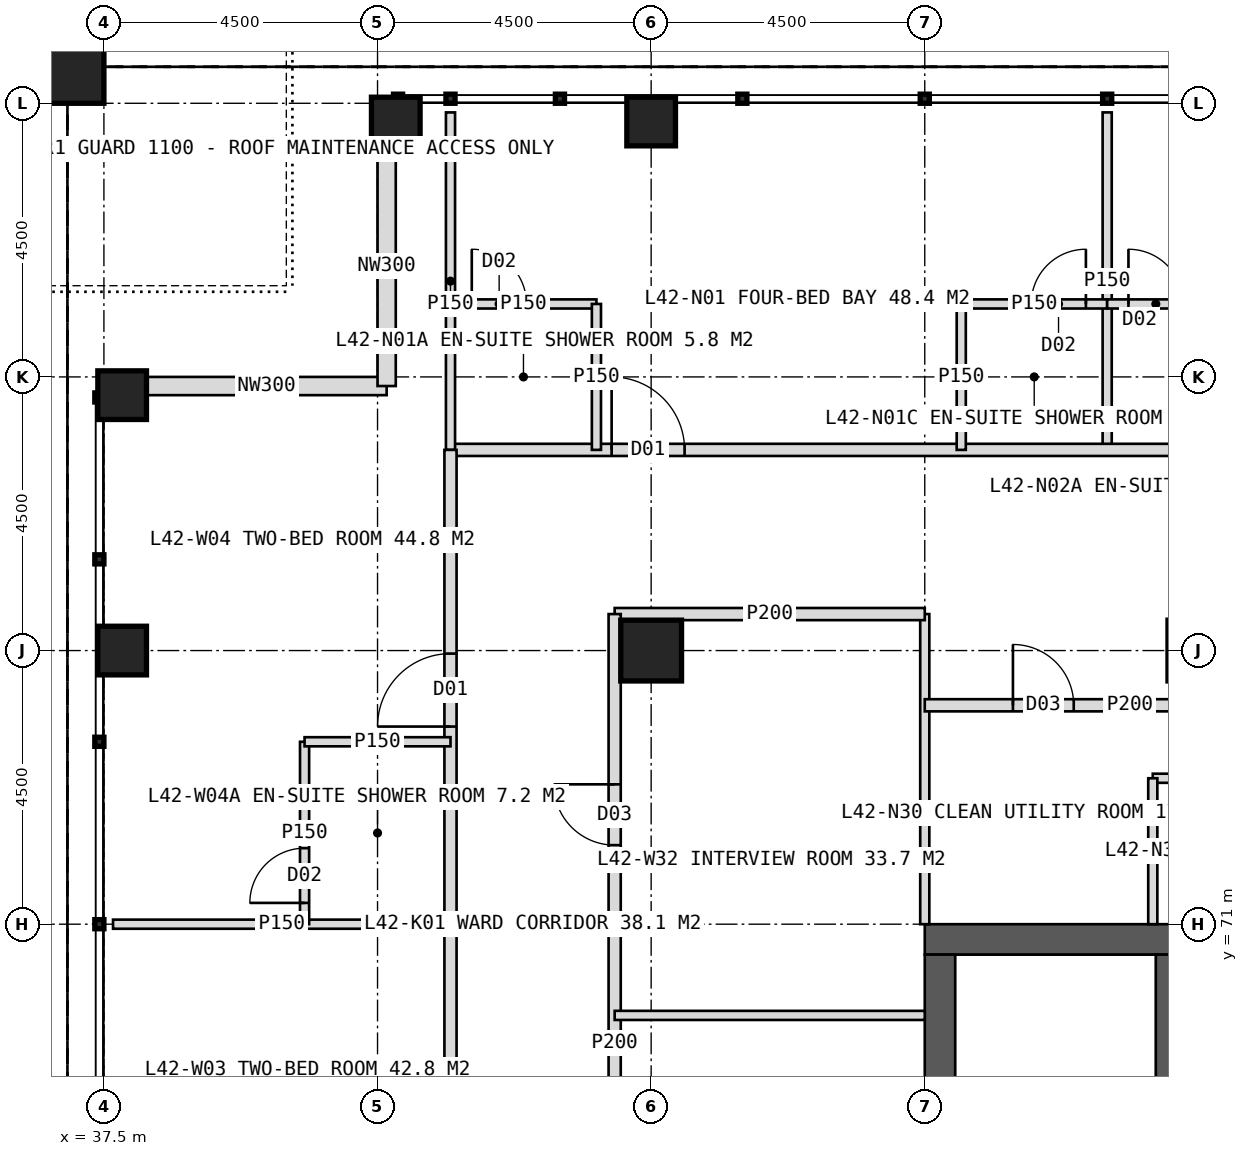
"""IFC4 building model, lengths in metres.
Left out: names, types, materials, properties, quantities, classifications, styles, units other than length and angle.
Written with IfcOpenShell. Run it as: python <this file> out.ifc"""

import sys

from ifc_helpers import new_model, si_unit, direction, frame, frame_2d, origin, origin_2d, place, context, subcontext, project, spatial, rectangle, hollow_rectangle, extrude, element, fill, save


model = new_model("IFC4")
c1 = context("Model", 3, precision=1e-05, world=origin(), true_north=direction((0.0, 1.0)))
c2 = subcontext(c1, "Body", "Model", "MODEL_VIEW")
j1 = project(units=[si_unit("LENGTHUNIT", "METRE"), si_unit("PLANEANGLEUNIT", "RADIAN")], contexts=[c1])
p1 = place(None, origin())
s1 = spatial("IfcSite", under=j1, at=p1, CompositionType="ELEMENT")
p2 = place(p1, origin())
s2 = spatial("IfcBuilding", under=s1, at=p2, CompositionType="ELEMENT")
p3 = place(p2, frame((0.0, 0.0, 177.0)))
s3 = spatial("IfcBuildingStorey", under=s2, at=p3, CompositionType="ELEMENT", Elevation=177.0)
p4 = place(p3, frame((51.0, 70.75, 0.0), z_axis=(0.0, 0.0, 1.0), x_axis=(1.0, 0.0, 0.0)))
e1 = element("IfcWall", 1, at=p4, inside=s3, PredefinedType="SHEAR", context=c2, shape_type="SweptSolid", body=[
    extrude(rectangle(XDim=18.0, YDim=0.5, at=frame_2d((9.0, 0.0))), origin(), (0.0, 0.0, 1.0), 4.0),
])
p5 = place(p4, frame((8.1, 0.0, 0.0)))
e2 = element("IfcOpeningElement", 2, at=p5, cuts=e1, PredefinedType="OPENING", context=c2, shape_type="SweptSolid", body=[
    extrude(rectangle(XDim=1.8, YDim=2.2, at=frame_2d((0.9, 1.1))), frame((0.0, 0.26, 0.0), z_axis=(0.0, -1.0, 0.0), x_axis=(1.0, 0.0, 0.0)), (0.0, 0.0, 1.0), 0.52),
])
p6 = place(p3, frame((51.25, 53.5, 0.0), z_axis=(0.0, 0.0, 1.0), x_axis=(0.0, 1.0, 0.0)))
e3 = element("IfcWall", 3, at=p6, inside=s3, PredefinedType="SHEAR", context=c2, shape_type="SweptSolid", body=[
    extrude(rectangle(XDim=17.0, YDim=0.5, at=frame_2d((8.5, 0.0))), origin(), (0.0, 0.0, 1.0), 4.0),
])
p7 = place(p6, frame((6.1, 0.0, 0.0)))
e4 = element("IfcOpeningElement", 4, at=p7, cuts=e3, PredefinedType="OPENING", context=c2, shape_type="SweptSolid", body=[
    extrude(rectangle(XDim=1.5, YDim=2.2, at=frame_2d((0.75, 1.1))), frame((0.0, 0.26, 0.0), z_axis=(0.0, -1.0, 0.0), x_axis=(1.0, 0.0, 0.0)), (0.0, 0.0, 1.0), 0.52),
])
p8 = place(p3, frame((54.95, 53.5, 0.0), z_axis=(0.0, 0.0, 1.0), x_axis=(0.0, 1.0, 0.0)))
e5 = element("IfcWall", 5, at=p8, inside=s3, PredefinedType="SHEAR", context=c2, shape_type="SweptSolid", body=[
    extrude(rectangle(XDim=17.0, YDim=0.3, at=frame_2d((8.5, 0.0))), origin(), (0.0, 0.0, 1.0), 4.0),
])
p9 = place(p3, frame((46.5, 75.5, 0.0), z_axis=(0.0, 0.0, 1.0), x_axis=(1.0, 0.0, 0.0)))
e6 = element("IfcColumn", 6, at=p9, inside=s3, PredefinedType="COLUMN", context=c2, shape_type="SweptSolid", body=[
    extrude(hollow_rectangle(XDim=1.0, YDim=1.0, WallThickness=0.1, at=origin_2d()), origin(), (0.0, 0.0, 1.0), 4.0),
])
for number, where, z_axis, x_axis in (
    (7, (42.3, 84.2, 0.0), (0.0, 0.0, 1.0), (1.0, 0.0, 0.0)),
    (8, (46.5, 84.2, 0.0), (0.0, 0.0, 1.0), (1.0, 0.0, 0.0)),
    (9, (37.8, 75.5, 0.0), (0.0, 0.0, 1.0), (1.0, 0.0, 0.0)),
    (10, (37.8, 79.7, 0.0), (0.0, 0.0, 1.0), (1.0, 0.0, 0.0)),
):
    element("IfcColumn", number, at=place(p3, frame(where, z_axis=z_axis, x_axis=x_axis)), inside=s3, PredefinedType="COLUMN", context=c2, shape_type="SweptSolid", body=[
        extrude(hollow_rectangle(XDim=0.8, YDim=0.8, WallThickness=0.08, at=origin_2d()), origin(), (0.0, 0.0, 1.0), 4.0),
    ])
p10 = place(p3, frame((36.9, 85.1, 2.0), z_axis=(0.0, 0.0, 1.0), x_axis=(1.0, 0.0, 0.0)))
e11 = element("IfcColumn", 11, at=p10, inside=s3, PredefinedType="COLUMN", context=c2, shape_type="SweptSolid", body=[
    extrude(hollow_rectangle(XDim=1.2, YDim=1.2, WallThickness=0.07, at=origin_2d()), origin(), (0.0, 0.0, 1.0), 2.0),
])
for number, where, z_axis, x_axis in (
    (12, (38.2, 79.85, 0.0), (0.0, 0.0, 1.0), (1.0, 0.0, 0.0)),
    (13, (42.15, 79.85, 0.0), (0.0, 0.0, 1.0), (0.0, 1.0, 0.0)),
):
    element("IfcWall", number, at=place(p3, frame(where, z_axis=z_axis, x_axis=x_axis)), inside=s3, PredefinedType="ELEMENTEDWALL", context=c2, shape_type="SweptSolid", body=[
        extrude(rectangle(XDim=3.95, YDim=0.3, at=frame_2d((1.975, 0.0))), origin(), (0.0, 0.0, 1.0), 2.85),
    ])
p11 = place(p3, frame((54.0, 78.8, 0.0), z_axis=(0.0, 0.0, 1.0), x_axis=(0.0, 1.0, 0.0)))
e14 = element("IfcWall", 14, at=p11, inside=s3, PredefinedType="PARTITIONING", context=c2, shape_type="SweptSolid", body=[
    extrude(rectangle(XDim=5.55, YDim=0.15, at=frame_2d((2.775, 0.0))), origin(), (0.0, 0.0, 1.0), 3.75),
])
p12 = place(p3, frame((43.2, 78.8, 0.0), z_axis=(0.0, 0.0, 1.0), x_axis=(1.0, 0.0, 0.0)))
e15 = element("IfcWall", 15, at=p12, inside=s3, PredefinedType="PARTITIONING", context=c2, shape_type="SweptSolid", body=[
    extrude(rectangle(XDim=33.6, YDim=0.2, at=frame_2d((16.8, 0.0))), origin(), (0.0, 0.0, 1.0), 3.75),
])
p13 = place(p12, frame((2.65, 0.0, 0.0)))
e16 = element("IfcOpeningElement", 16, at=p13, cuts=e15, PredefinedType="OPENING", context=c2, shape_type="SweptSolid", body=[
    extrude(rectangle(XDim=1.2, YDim=2.2, at=frame_2d((0.6, 1.1))), frame((0.0, 0.11, 0.0), z_axis=(0.0, -1.0, 0.0), x_axis=(1.0, 0.0, 0.0)), (0.0, 0.0, 1.0), 0.22),
])
p14 = place(p12, frame((14.05, 0.0, 0.0)))
e17 = element("IfcOpeningElement", 17, at=p14, cuts=e15, PredefinedType="OPENING", context=c2, shape_type="SweptSolid", body=[
    extrude(rectangle(XDim=1.2, YDim=2.2, at=frame_2d((0.6, 1.1))), frame((0.0, 0.11, 0.0), z_axis=(0.0, -1.0, 0.0), x_axis=(1.0, 0.0, 0.0)), (0.0, 0.0, 1.0), 0.22),
])
p15 = place(p12, frame((22.45, 0.0, 0.0)))
e18 = element("IfcOpeningElement", 18, at=p15, cuts=e15, PredefinedType="OPENING", context=c2, shape_type="SweptSolid", body=[
    extrude(rectangle(XDim=1.2, YDim=2.2, at=frame_2d((0.6, 1.1))), frame((0.0, 0.11, 0.0), z_axis=(0.0, -1.0, 0.0), x_axis=(1.0, 0.0, 0.0)), (0.0, 0.0, 1.0), 0.22),
])
p16 = place(p12, frame((28.05, 0.0, 0.0)))
e19 = element("IfcOpeningElement", 19, at=p16, cuts=e15, PredefinedType="OPENING", context=c2, shape_type="SweptSolid", body=[
    extrude(rectangle(XDim=1.0, YDim=2.1, at=frame_2d((0.5, 1.05))), frame((0.0, 0.11, 0.0), z_axis=(0.0, -1.0, 0.0), x_axis=(1.0, 0.0, 0.0)), (0.0, 0.0, 1.0), 0.22),
])
p17 = place(p12, frame((31.95, 0.0, 0.0)))
e20 = element("IfcOpeningElement", 20, at=p17, cuts=e15, PredefinedType="OPENING", context=c2, shape_type="SweptSolid", body=[
    extrude(rectangle(XDim=1.0, YDim=2.1, at=frame_2d((0.5, 1.05))), frame((0.0, 0.11, 0.0), z_axis=(0.0, -1.0, 0.0), x_axis=(1.0, 0.0, 0.0)), (0.0, 0.0, 1.0), 0.22),
])
p18 = place(p3, frame((43.2, 78.8, 0.0), z_axis=(0.0, 0.0, 1.0), x_axis=(0.0, 1.0, 0.0)))
e21 = element("IfcWall", 21, at=p18, inside=s3, PredefinedType="PARTITIONING", context=c2, shape_type="SweptSolid", body=[
    extrude(rectangle(XDim=5.55, YDim=0.15, at=frame_2d((2.775, 0.0))), origin(), (0.0, 0.0, 1.0), 3.75),
])
p19 = place(p3, frame((43.2, 81.2, 0.0), z_axis=(0.0, 0.0, 1.0), x_axis=(1.0, 0.0, 0.0)))
e22 = element("IfcWall", 22, at=p19, inside=s3, PredefinedType="PARTITIONING", context=c2, shape_type="SweptSolid", body=[
    extrude(rectangle(XDim=2.4, YDim=0.15, at=frame_2d((1.2, 0.0))), origin(), (0.0, 0.0, 1.0), 3.75),
])
p20 = place(p19, frame((0.35, 0.0, 0.0)))
e23 = element("IfcOpeningElement", 23, at=p20, cuts=e22, PredefinedType="OPENING", context=c2, shape_type="SweptSolid", body=[
    extrude(rectangle(XDim=0.9, YDim=2.1, at=frame_2d((0.45, 1.05))), frame((0.0, 0.085, 0.0), z_axis=(0.0, -1.0, 0.0), x_axis=(1.0, 0.0, 0.0)), (0.0, 0.0, 1.0), 0.17),
])
p21 = place(p3, frame((45.6, 78.8, 0.0), z_axis=(0.0, 0.0, 1.0), x_axis=(0.0, 1.0, 0.0)))
e24 = element("IfcWall", 24, at=p21, inside=s3, PredefinedType="PARTITIONING", context=c2, shape_type="SweptSolid", body=[
    extrude(rectangle(XDim=2.4, YDim=0.15, at=frame_2d((1.2, 0.0))), origin(), (0.0, 0.0, 1.0), 3.75),
])
p22 = place(p3, frame((51.6, 81.2, 0.0), z_axis=(0.0, 0.0, 1.0), x_axis=(1.0, 0.0, 0.0)))
e25 = element("IfcWall", 25, at=p22, inside=s3, PredefinedType="PARTITIONING", context=c2, shape_type="SweptSolid", body=[
    extrude(rectangle(XDim=2.4, YDim=0.15, at=frame_2d((1.2, 0.0))), origin(), (0.0, 0.0, 1.0), 3.75),
])
p23 = place(p22, frame((1.15, 0.0, 0.0)))
e26 = element("IfcOpeningElement", 26, at=p23, cuts=e25, PredefinedType="OPENING", context=c2, shape_type="SweptSolid", body=[
    extrude(rectangle(XDim=0.9, YDim=2.1, at=frame_2d((0.45, 1.05))), frame((0.0, 0.085, 0.0), z_axis=(0.0, -1.0, 0.0), x_axis=(1.0, 0.0, 0.0)), (0.0, 0.0, 1.0), 0.17),
])
p24 = place(p3, frame((51.6, 78.8, 0.0), z_axis=(0.0, 0.0, 1.0), x_axis=(0.0, 1.0, 0.0)))
e27 = element("IfcWall", 27, at=p24, inside=s3, PredefinedType="PARTITIONING", context=c2, shape_type="SweptSolid", body=[
    extrude(rectangle(XDim=2.4, YDim=0.15, at=frame_2d((1.2, 0.0))), origin(), (0.0, 0.0, 1.0), 3.75),
])
p25 = place(p3, frame((54.0, 81.2, 0.0), z_axis=(0.0, 0.0, 1.0), x_axis=(1.0, 0.0, 0.0)))
e28 = element("IfcWall", 28, at=p25, inside=s3, PredefinedType="PARTITIONING", context=c2, shape_type="SweptSolid", body=[
    extrude(rectangle(XDim=3.0, YDim=0.15, at=frame_2d((1.5, 0.0))), origin(), (0.0, 0.0, 1.0), 3.75),
])
p26 = place(p25, frame((0.35, 0.0, 0.0)))
e29 = element("IfcOpeningElement", 29, at=p26, cuts=e28, PredefinedType="OPENING", context=c2, shape_type="SweptSolid", body=[
    extrude(rectangle(XDim=0.9, YDim=2.1, at=frame_2d((0.45, 1.05))), frame((0.0, 0.085, 0.0), z_axis=(0.0, -1.0, 0.0), x_axis=(1.0, 0.0, 0.0)), (0.0, 0.0, 1.0), 0.17),
])
p27 = place(p3, frame((51.0, 71.0, 0.0), z_axis=(0.0, 0.0, 1.0), x_axis=(0.0, 1.0, 0.0)))
e30 = element("IfcWall", 30, at=p27, inside=s3, PredefinedType="PARTITIONING", context=c2, shape_type="SweptSolid", body=[
    extrude(rectangle(XDim=5.1, YDim=0.15, at=frame_2d((2.55, 0.0))), origin(), (0.0, 0.0, 1.0), 3.75),
])
p28 = place(p3, frame((45.9, 76.1, 0.0), z_axis=(0.0, 0.0, 1.0), x_axis=(1.0, 0.0, 0.0)))
e31 = element("IfcWall", 31, at=p28, inside=s3, PredefinedType="PARTITIONING", context=c2, shape_type="SweptSolid", body=[
    extrude(rectangle(XDim=5.1, YDim=0.2, at=frame_2d((2.55, 0.0))), origin(), (0.0, 0.0, 1.0), 3.75),
])
p29 = place(p3, frame((51.0, 74.6, 0.0), z_axis=(0.0, 0.0, 1.0), x_axis=(1.0, 0.0, 0.0)))
e32 = element("IfcWall", 32, at=p29, inside=s3, PredefinedType="PARTITIONING", context=c2, shape_type="SweptSolid", body=[
    extrude(rectangle(XDim=6.75, YDim=0.2, at=frame_2d((3.375, 0.0))), origin(), (0.0, 0.0, 1.0), 3.75),
])
p30 = place(p29, frame((1.45, 0.0, 0.0)))
e33 = element("IfcOpeningElement", 33, at=p30, cuts=e32, PredefinedType="OPENING", context=c2, shape_type="SweptSolid", body=[
    extrude(rectangle(XDim=1.0, YDim=2.1, at=frame_2d((0.5, 1.05))), frame((0.0, 0.11, 0.0), z_axis=(0.0, -1.0, 0.0), x_axis=(1.0, 0.0, 0.0)), (0.0, 0.0, 1.0), 0.22),
])
p31 = place(p3, frame((54.75, 73.4, 0.0), z_axis=(0.0, 0.0, 1.0), x_axis=(1.0, 0.0, 0.0)))
e34 = element("IfcWall", 34, at=p31, inside=s3, PredefinedType="PARTITIONING", context=c2, shape_type="SweptSolid", body=[
    extrude(rectangle(XDim=3.0, YDim=0.15, at=frame_2d((1.5, 0.0))), origin(), (0.0, 0.0, 1.0), 3.75),
])
p32 = place(p3, frame((54.75, 71.0, 0.0), z_axis=(0.0, 0.0, 1.0), x_axis=(0.0, 1.0, 0.0)))
e35 = element("IfcWall", 35, at=p32, inside=s3, PredefinedType="PARTITIONING", context=c2, shape_type="SweptSolid", body=[
    extrude(rectangle(XDim=2.4, YDim=0.15, at=frame_2d((1.2, 0.0))), origin(), (0.0, 0.0, 1.0), 3.75),
])
p33 = place(p3, frame((43.2, 71.0, 0.0), z_axis=(0.0, 0.0, 1.0), x_axis=(-1.0, 0.0, 0.0)))
e36 = element("IfcWall", 36, at=p33, inside=s3, PredefinedType="PARTITIONING", context=c2, shape_type="SweptSolid", body=[
    extrude(rectangle(XDim=5.55, YDim=0.15, at=frame_2d((2.775, 0.0))), origin(), (0.0, 0.0, 1.0), 3.75),
])
p34 = place(p3, frame((43.2, 45.2, 0.0), z_axis=(0.0, 0.0, 1.0), x_axis=(0.0, 1.0, 0.0)))
e37 = element("IfcWall", 37, at=p34, inside=s3, PredefinedType="PARTITIONING", context=c2, shape_type="SweptSolid", body=[
    extrude(rectangle(XDim=33.6, YDim=0.2, at=frame_2d((16.8, 0.0))), origin(), (0.0, 0.0, 1.0), 3.75),
])
p35 = place(p34, frame((2.65, 0.0, 0.0)))
e38 = element("IfcOpeningElement", 38, at=p35, cuts=e37, PredefinedType="OPENING", context=c2, shape_type="SweptSolid", body=[
    extrude(rectangle(XDim=1.2, YDim=2.2, at=frame_2d((0.6, 1.1))), frame((0.0, 0.11, 0.0), z_axis=(0.0, -1.0, 0.0), x_axis=(1.0, 0.0, 0.0)), (0.0, 0.0, 1.0), 0.22),
])
p36 = place(p34, frame((13.45, 0.0, 0.0)))
e39 = element("IfcOpeningElement", 39, at=p36, cuts=e37, PredefinedType="OPENING", context=c2, shape_type="SweptSolid", body=[
    extrude(rectangle(XDim=1.2, YDim=2.2, at=frame_2d((0.6, 1.1))), frame((0.0, 0.11, 0.0), z_axis=(0.0, -1.0, 0.0), x_axis=(1.0, 0.0, 0.0)), (0.0, 0.0, 1.0), 0.22),
])
p37 = place(p34, frame((20.05, 0.0, 0.0)))
e40 = element("IfcOpeningElement", 40, at=p37, cuts=e37, PredefinedType="OPENING", context=c2, shape_type="SweptSolid", body=[
    extrude(rectangle(XDim=1.2, YDim=2.2, at=frame_2d((0.6, 1.1))), frame((0.0, 0.11, 0.0), z_axis=(0.0, -1.0, 0.0), x_axis=(1.0, 0.0, 0.0)), (0.0, 0.0, 1.0), 0.22),
])
p38 = place(p34, frame((29.05, 0.0, 0.0)))
e41 = element("IfcOpeningElement", 41, at=p38, cuts=e37, PredefinedType="OPENING", context=c2, shape_type="SweptSolid", body=[
    extrude(rectangle(XDim=1.2, YDim=2.2, at=frame_2d((0.6, 1.1))), frame((0.0, 0.11, 0.0), z_axis=(0.0, -1.0, 0.0), x_axis=(1.0, 0.0, 0.0)), (0.0, 0.0, 1.0), 0.22),
])
p39 = place(p3, frame((40.8, 71.0, 0.0), z_axis=(0.0, 0.0, 1.0), x_axis=(0.0, 1.0, 0.0)))
e42 = element("IfcWall", 42, at=p39, inside=s3, PredefinedType="PARTITIONING", context=c2, shape_type="SweptSolid", body=[
    extrude(rectangle(XDim=3.0, YDim=0.15, at=frame_2d((1.5, 0.0))), origin(), (0.0, 0.0, 1.0), 3.75),
])
p40 = place(p39, frame((0.35, 0.0, 0.0)))
e43 = element("IfcOpeningElement", 43, at=p40, cuts=e42, PredefinedType="OPENING", context=c2, shape_type="SweptSolid", body=[
    extrude(rectangle(XDim=0.9, YDim=2.1, at=frame_2d((0.45, 1.05))), frame((0.0, 0.085, 0.0), z_axis=(0.0, -1.0, 0.0), x_axis=(1.0, 0.0, 0.0)), (0.0, 0.0, 1.0), 0.17),
])
p41 = place(p3, frame((43.2, 74.0, 0.0), z_axis=(0.0, 0.0, 1.0), x_axis=(-1.0, 0.0, 0.0)))
e44 = element("IfcWall", 44, at=p41, inside=s3, PredefinedType="PARTITIONING", context=c2, shape_type="SweptSolid", body=[
    extrude(rectangle(XDim=2.4, YDim=0.15, at=frame_2d((1.2, 0.0))), origin(), (0.0, 0.0, 1.0), 3.75),
])
p42 = place(p3, frame((45.9, 62.0, 0.0), z_axis=(0.0, 0.0, 1.0), x_axis=(0.0, 1.0, 0.0)))
e45 = element("IfcWall", 45, at=p42, inside=s3, PredefinedType="PARTITIONING", context=c2, shape_type="SweptSolid", body=[
    extrude(rectangle(XDim=14.1, YDim=0.2, at=frame_2d((7.05, 0.0))), origin(), (0.0, 0.0, 1.0), 3.75),
])
p43 = place(p42, frame((1.45, 0.0, 0.0)))
e46 = element("IfcOpeningElement", 46, at=p43, cuts=e45, PredefinedType="OPENING", context=c2, shape_type="SweptSolid", body=[
    extrude(rectangle(XDim=1.0, YDim=2.1, at=frame_2d((0.5, 1.05))), frame((0.0, 0.11, 0.0), z_axis=(0.0, -1.0, 0.0), x_axis=(1.0, 0.0, 0.0)), (0.0, 0.0, 1.0), 0.22),
])
p44 = place(p42, frame((10.3, 0.0, 0.0)))
e47 = element("IfcOpeningElement", 47, at=p44, cuts=e45, PredefinedType="OPENING", context=c2, shape_type="SweptSolid", body=[
    extrude(rectangle(XDim=1.0, YDim=2.1, at=frame_2d((0.5, 1.05))), frame((0.0, 0.11, 0.0), z_axis=(0.0, -1.0, 0.0), x_axis=(1.0, 0.0, 0.0)), (0.0, 0.0, 1.0), 0.22),
])
p45 = place(p3, frame((51.0, 69.5, 0.0), z_axis=(0.0, 0.0, 1.0), x_axis=(-1.0, 0.0, 0.0)))
e48 = element("IfcWall", 48, at=p45, inside=s3, PredefinedType="PARTITIONING", context=c2, shape_type="SweptSolid", body=[
    extrude(rectangle(XDim=5.1, YDim=0.15, at=frame_2d((2.55, 0.0))), origin(), (0.0, 0.0, 1.0), 3.75),
])
p46 = place(p13, origin())
e49 = element("IfcDoor", 49, at=p46, inside=s3, OperationType="SINGLE_SWING_LEFT", PredefinedType="DOOR", context=c2, shape_type="SweptSolid", body=[
    extrude(rectangle(XDim=1.2, YDim=2.2, at=frame_2d((0.6, 1.1))), frame((0.0, 0.025, 0.0), z_axis=(0.0, -1.0, 0.0), x_axis=(1.0, 0.0, 0.0)), (0.0, 0.0, 1.0), 0.05),
])
fill(e16, e49)
p47 = place(p20, origin())
e50 = element("IfcDoor", 50, at=p47, inside=s3, OperationType="SINGLE_SWING_LEFT", PredefinedType="DOOR", context=c2, shape_type="SweptSolid", body=[
    extrude(rectangle(XDim=0.9, YDim=2.1, at=frame_2d((0.45, 1.05))), frame((0.0, 0.025, 0.0), z_axis=(0.0, -1.0, 0.0), x_axis=(1.0, 0.0, 0.0)), (0.0, 0.0, 1.0), 0.05),
])
fill(e23, e50)
p48 = place(p23, origin())
e51 = element("IfcDoor", 51, at=p48, inside=s3, OperationType="SINGLE_SWING_RIGHT", PredefinedType="DOOR", context=c2, shape_type="SweptSolid", body=[
    extrude(rectangle(XDim=0.9, YDim=2.1, at=frame_2d((0.45, 1.05))), frame((0.0, 0.025, 0.0), z_axis=(0.0, -1.0, 0.0), x_axis=(1.0, 0.0, 0.0)), (0.0, 0.0, 1.0), 0.05),
])
fill(e26, e51)
p49 = place(p26, origin())
e52 = element("IfcDoor", 52, at=p49, inside=s3, OperationType="SINGLE_SWING_LEFT", PredefinedType="DOOR", context=c2, shape_type="SweptSolid", body=[
    extrude(rectangle(XDim=0.9, YDim=2.1, at=frame_2d((0.45, 1.05))), frame((0.0, 0.025, 0.0), z_axis=(0.0, -1.0, 0.0), x_axis=(1.0, 0.0, 0.0)), (0.0, 0.0, 1.0), 0.05),
])
fill(e29, e52)
p50 = place(p30, origin())
e53 = element("IfcDoor", 53, at=p50, inside=s3, OperationType="SINGLE_SWING_LEFT", PredefinedType="DOOR", context=c2, shape_type="SweptSolid", body=[
    extrude(rectangle(XDim=1.0, YDim=2.1, at=frame_2d((0.5, 1.05))), frame((0.0, 0.025, 0.0), z_axis=(0.0, -1.0, 0.0), x_axis=(1.0, 0.0, 0.0)), (0.0, 0.0, 1.0), 0.05),
])
fill(e33, e53)
p51 = place(p38, origin())
e54 = element("IfcDoor", 54, at=p51, inside=s3, OperationType="SINGLE_SWING_LEFT", PredefinedType="DOOR", context=c2, shape_type="SweptSolid", body=[
    extrude(rectangle(XDim=1.2, YDim=2.2, at=frame_2d((0.6, 1.1))), frame((0.0, 0.025, 0.0), z_axis=(0.0, -1.0, 0.0), x_axis=(1.0, 0.0, 0.0)), (0.0, 0.0, 1.0), 0.05),
])
fill(e41, e54)
p52 = place(p40, origin())
e55 = element("IfcDoor", 55, at=p52, inside=s3, OperationType="SINGLE_SWING_LEFT", PredefinedType="DOOR", context=c2, shape_type="SweptSolid", body=[
    extrude(rectangle(XDim=0.9, YDim=2.1, at=frame_2d((0.45, 1.05))), frame((0.0, 0.025, 0.0), z_axis=(0.0, -1.0, 0.0), x_axis=(1.0, 0.0, 0.0)), (0.0, 0.0, 1.0), 0.05),
])
fill(e43, e55)
p53 = place(p44, origin())
e56 = element("IfcDoor", 56, at=p53, inside=s3, OperationType="SINGLE_SWING_RIGHT", PredefinedType="DOOR", context=c2, shape_type="SweptSolid", body=[
    extrude(rectangle(XDim=1.0, YDim=2.1, at=frame_2d((0.5, 1.05))), frame((0.0, 0.025, 0.0), z_axis=(0.0, -1.0, 0.0), x_axis=(1.0, 0.0, 0.0)), (0.0, 0.0, 1.0), 0.05),
])
fill(e47, e56)
save(model, sys.argv[1])
